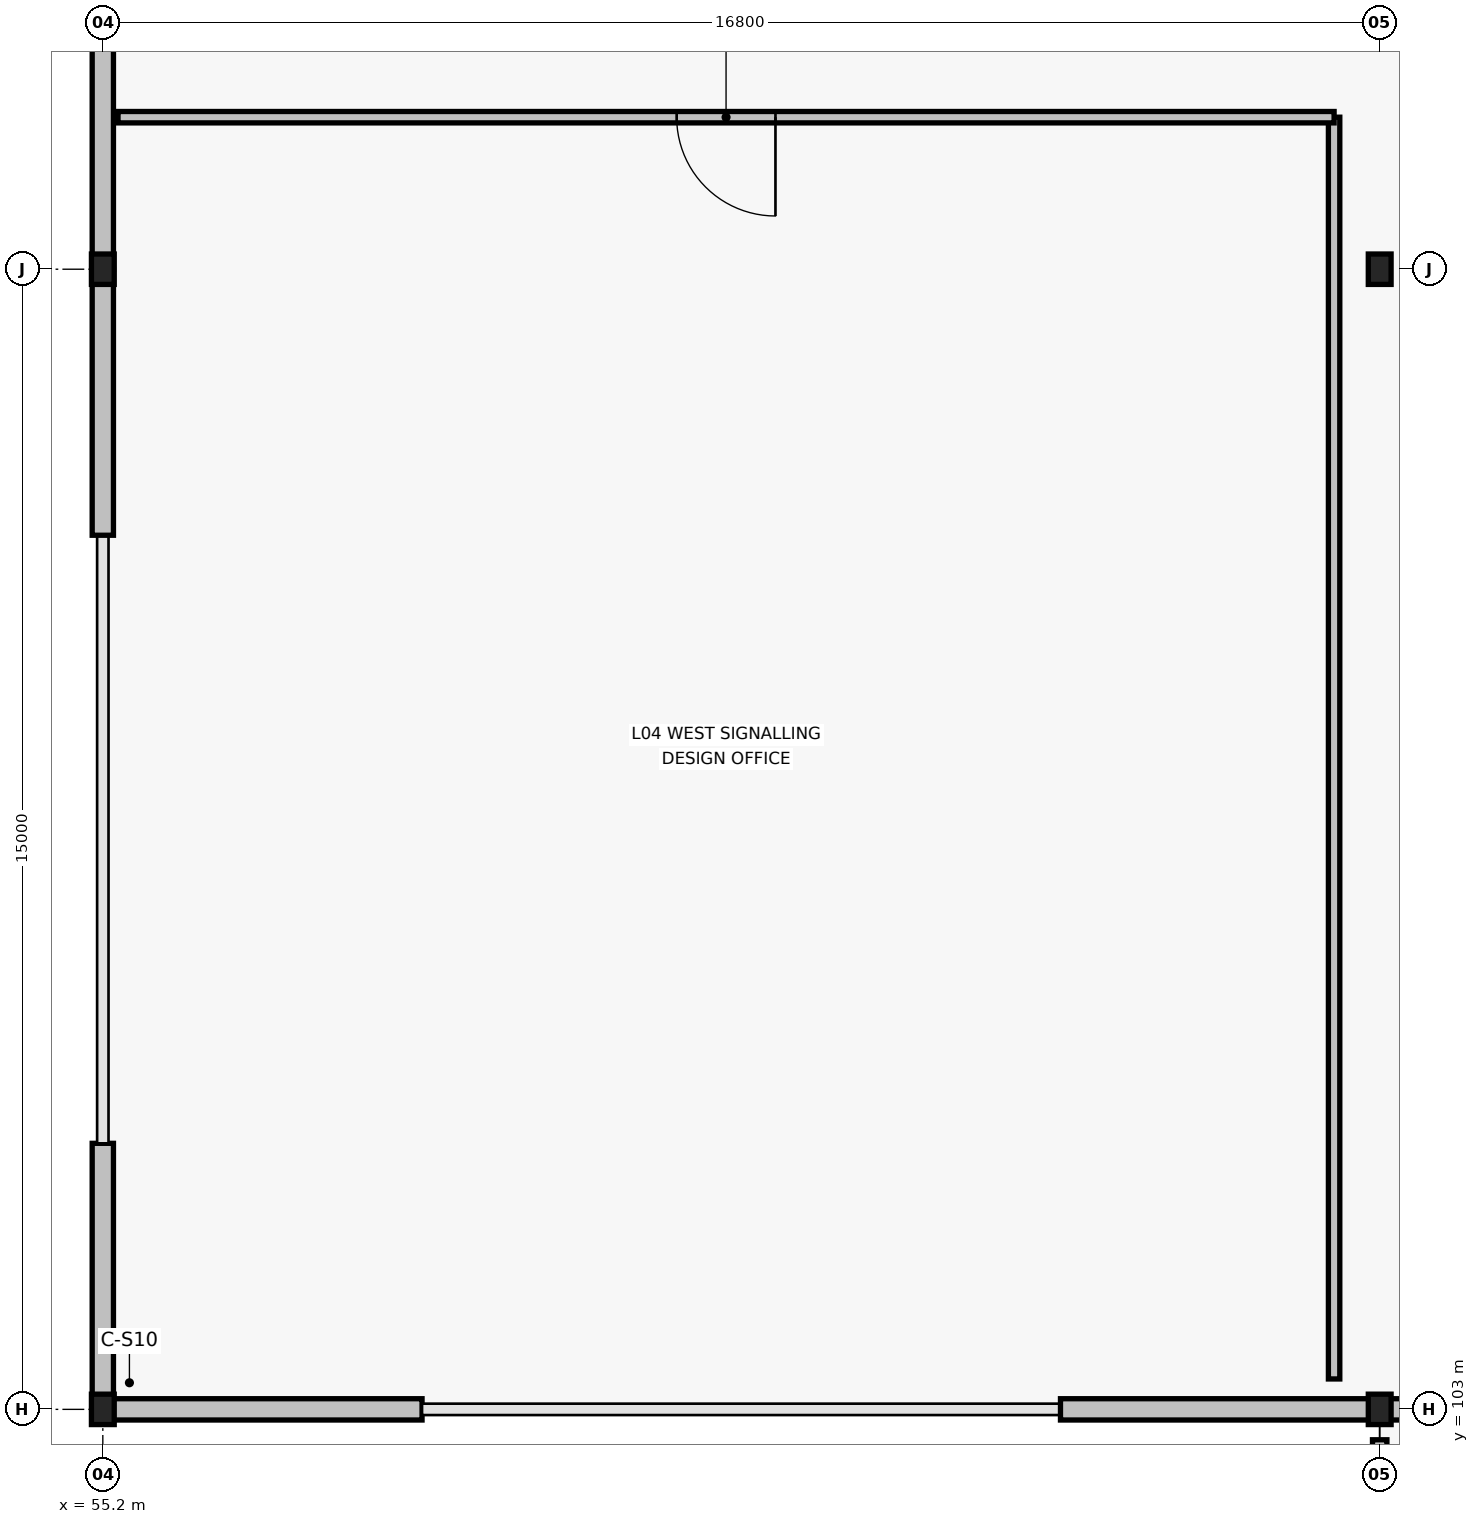
"""IFC4 building model, lengths in metres.
Left out: names, types, materials, properties, quantities, classifications, styles, units other than length and angle.
Written with IfcOpenShell. Run it as: python <this file> out.ifc"""

import sys

from ifc_helpers import new_model, si_unit, direction, frame, frame_2d, origin, origin_2d, place, context, subcontext, project, spatial, rectangle, i_section, extrude, element, fill, save


model = new_model("IFC4")
c1 = context("Model", 3, precision=1e-05, world=origin(), true_north=direction((0.0, 1.0)))
c2 = subcontext(c1, "Body", "Model", "MODEL_VIEW")
j1 = project(units=[si_unit("LENGTHUNIT", "METRE"), si_unit("PLANEANGLEUNIT", "RADIAN")], contexts=[c1])
p1 = place(None, origin())
s1 = spatial("IfcSite", under=j1, at=p1, CompositionType="ELEMENT")
p2 = place(p1, origin())
s2 = spatial("IfcBuilding", under=s1, at=p2, CompositionType="ELEMENT")
p3 = place(p2, frame((0.0, 0.0, 21.0)))
s3 = spatial("IfcBuildingStorey", under=s2, at=p3, CompositionType="ELEMENT", Elevation=21.0)
for number, where, z_axis, x_axis in (
    (1, (55.2, 103.0, 0.0), (0.0, 0.0, 1.0), (1.0, 0.0, 0.0)),
    (2, (55.2, 118.0, 0.0), (0.0, 0.0, 1.0), (1.0, 0.0, 0.0)),
    (3, (72.0, 103.0, 0.0), (0.0, 0.0, 1.0), (1.0, 0.0, 0.0)),
    (4, (72.0, 118.0, 0.0), (0.0, 0.0, 1.0), (1.0, 0.0, 0.0)),
):
    element("IfcColumn", number, at=place(p3, frame(where, z_axis=z_axis, x_axis=x_axis)), inside=s3, PredefinedType="COLUMN", context=c2, shape_type="SweptSolid", body=[
        extrude(i_section(OverallWidth=0.3, OverallDepth=0.4, WebThickness=0.013, FlangeThickness=0.024, FilletRadius=0.027, at=origin_2d()), origin(), (0.0, 0.0, 1.0), 3.9),
    ])
for number, where, z_axis, x_axis in (
    (5, (55.2, 103.0, 0.0), (0.0, 0.0, 1.0), (1.0, 0.0, 0.0)),
    (6, (67.8, 103.0, 0.0), (0.0, 0.0, 1.0), (1.0, 0.0, 0.0)),
):
    element("IfcWall", number, at=place(p3, frame(where, z_axis=z_axis, x_axis=x_axis)), inside=s3, PredefinedType="STANDARD", context=c2, shape_type="SweptSolid", body=[
        extrude(rectangle(XDim=4.2, YDim=0.28, at=frame_2d((2.1, 0.0))), origin(), (0.0, 0.0, 1.0), 3.105),
    ])
p4 = place(p3, frame((72.0, 103.0, 0.0), z_axis=(0.0, 0.0, 1.0), x_axis=(1.0, 0.0, 0.0)))
e7 = element("IfcWall", 7, at=p4, inside=s3, PredefinedType="STANDARD", context=c2, shape_type="SweptSolid", body=[
    extrude(rectangle(XDim=4.2, YDim=0.28, at=frame_2d((2.1, 0.0))), origin(), (0.0, 0.0, 1.0), 3.315),
])
p5 = place(p3, frame((55.2, 103.14, 0.0), z_axis=(0.0, 0.0, 1.0), x_axis=(0.0, 1.0, 0.0)))
e8 = element("IfcWall", 8, at=p5, inside=s3, PredefinedType="STANDARD", context=c2, shape_type="SweptSolid", body=[
    extrude(rectangle(XDim=3.36, YDim=0.28, at=frame_2d((1.68, 0.0))), origin(), (0.0, 0.0, 1.0), 3.205),
])
for number, where, z_axis, x_axis in (
    (9, (55.2, 114.5, 0.0), (0.0, 0.0, 1.0), (0.0, 1.0, 0.0)),
    (10, (55.2, 118.0, 0.0), (0.0, 0.0, 1.0), (0.0, 1.0, 0.0)),
):
    element("IfcWall", number, at=place(p3, frame(where, z_axis=z_axis, x_axis=x_axis)), inside=s3, PredefinedType="STANDARD", context=c2, shape_type="SweptSolid", body=[
        extrude(rectangle(XDim=3.5, YDim=0.28, at=frame_2d((1.75, 0.0))), origin(), (0.0, 0.0, 1.0), 3.205),
    ])
p6 = place(p3, frame((72.0, 102.6, 0.0), z_axis=(0.0, 0.0, 1.0), x_axis=(0.0, -1.0, 0.0)))
e11 = element("IfcWall", 11, at=p6, inside=s3, PredefinedType="PARAPET", context=c2, shape_type="SweptSolid", body=[
    extrude(rectangle(XDim=22.305, YDim=0.19, at=frame_2d((11.153, 0.0))), origin(), (0.0, 0.0, 1.0), 1.0),
])
p7 = place(p3, frame((71.4, 103.4, 0.0), z_axis=(0.0, 0.0, 1.0), x_axis=(0.0, 1.0, 0.0)))
e12 = element("IfcWall", 12, at=p7, inside=s3, PredefinedType="PARTITIONING", context=c2, shape_type="SweptSolid", body=[
    extrude(rectangle(XDim=16.6, YDim=0.15, at=frame_2d((8.3, 0.0))), origin(), (0.0, 0.0, 1.0), 3.315),
])
p8 = place(p3, frame((71.4, 120.0, 0.0), z_axis=(0.0, 0.0, 1.0), x_axis=(-1.0, 0.0, 0.0)))
e13 = element("IfcWall", 13, at=p8, inside=s3, PredefinedType="PARTITIONING", context=c2, shape_type="SweptSolid", body=[
    extrude(rectangle(XDim=16.0, YDim=0.15, at=frame_2d((8.0, 0.0))), origin(), (0.0, 0.0, 1.0), 3.71),
])
p9 = place(p8, frame((7.35, 0.0, 0.0)))
e14 = element("IfcOpeningElement", 14, at=p9, cuts=e13, PredefinedType="OPENING", context=c2, shape_type="SweptSolid", body=[
    extrude(rectangle(XDim=1.3, YDim=2.15, at=frame_2d((0.65, 1.075))), frame((0.0, 0.085, 0.0), z_axis=(0.0, -1.0, 0.0), x_axis=(1.0, 0.0, 0.0)), (0.0, 0.0, 1.0), 0.17),
])
p10 = place(p9, origin())
e15 = element("IfcDoor", 15, at=p10, inside=s3, OperationType="SINGLE_SWING_LEFT", PredefinedType="DOOR", context=c2, shape_type="SweptSolid", body=[
    extrude(rectangle(XDim=1.3, YDim=2.15, at=frame_2d((0.65, 1.075))), frame((0.0, 0.025, 0.0), z_axis=(0.0, -1.0, 0.0), x_axis=(1.0, 0.0, 0.0)), (0.0, 0.0, 1.0), 0.05),
])
fill(e14, e15)
save(model, sys.argv[1])
